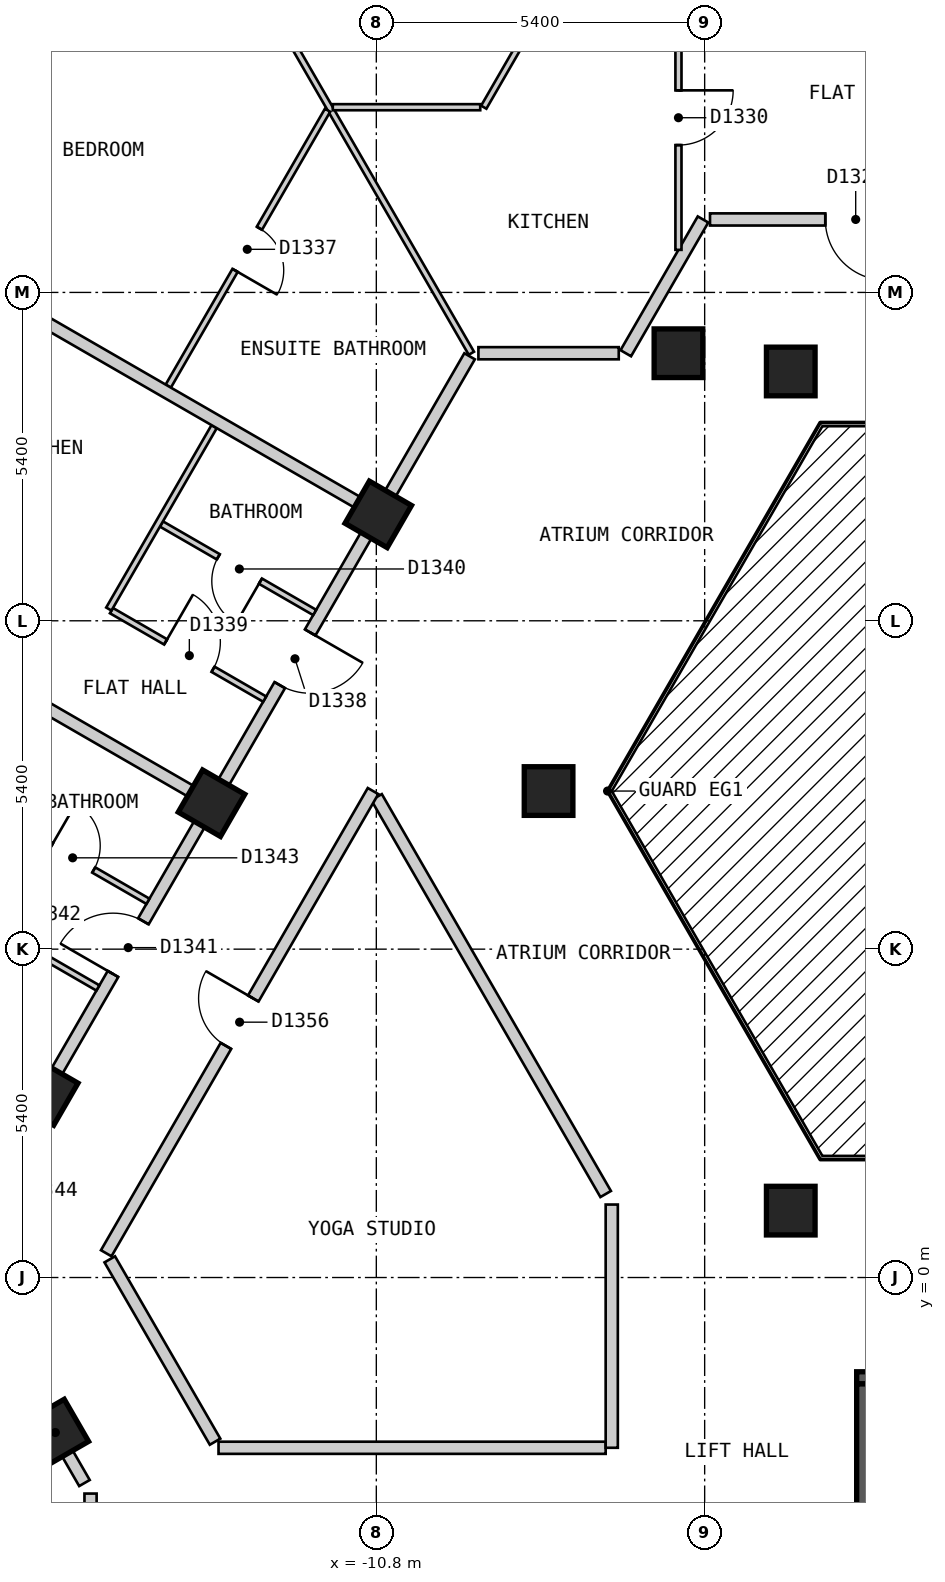
"""IFC4 building model, lengths in metres.
Left out: names, types, materials, properties, quantities, classifications, styles, units other than length and angle.
Written with IfcOpenShell. Run it as: python <this file> out.ifc"""

import sys

from ifc_helpers import new_model, si_unit, direction, frame, frame_2d, origin, origin_2d, place, context, subcontext, project, spatial, polyline, rectangle, outline, extrude, element, fill, save


model = new_model("IFC4")
c1 = context("Model", 3, precision=1e-05, world=origin(), true_north=direction((0.0, 1.0)))
c2 = subcontext(c1, "Body", "Model", "MODEL_VIEW")
j1 = project(units=[si_unit("LENGTHUNIT", "METRE"), si_unit("PLANEANGLEUNIT", "RADIAN")], contexts=[c1])
p1 = place(None, origin())
s1 = spatial("IfcSite", under=j1, at=p1, CompositionType="ELEMENT")
p2 = place(p1, origin())
s2 = spatial("IfcBuilding", under=s1, at=p2, CompositionType="ELEMENT")
p3 = place(p2, frame((0.0, 0.0, 147.6)))
s3 = spatial("IfcBuildingStorey", under=s2, at=p3, CompositionType="ELEMENT", Elevation=147.6)
for number, where, z_axis, x_axis in (
    (1, (-16.079, -2.549, 0.0), (0.0, 0.0, 1.0), (0.5, -0.866, 0.0)),
    (2, (-3.984, 14.9, 0.0), (0.0, 0.0, 1.0), (1.0, 0.0, 0.0)),
    (3, (-5.831, 15.2, 0.0), (0.0, 0.0, 1.0), (-1.0, 0.0, 0.0)),
    (4, (-10.768, 12.55, 0.0), (0.0, 0.0, 1.0), (-0.5, -0.866, 0.0)),
    (5, (-7.967, 8.0, 0.0), (0.0, 0.0, 1.0), (1.0, 0.0, 0.0)),
    (6, (-13.51, 7.8, 0.0), (0.0, 0.0, 1.0), (-0.5, -0.866, 0.0)),
    (7, (-3.984, 1.1, 0.0), (0.0, 0.0, 1.0), (1.0, 0.0, 0.0)),
    (8, (-16.253, 3.05, 0.0), (0.0, 0.0, 1.0), (-0.5, -0.866, 0.0)),
):
    element("IfcColumn", number, at=place(p3, frame(where, z_axis=z_axis, x_axis=x_axis)), inside=s3, PredefinedType="COLUMN", context=c2, shape_type="SweptSolid", body=[
        extrude(rectangle(XDim=0.8, YDim=0.8, at=origin_2d()), origin(), (0.0, 0.0, 1.0), 3.0),
    ])
p4 = place(p3, frame((-28.218, -2.025, 0.0), z_axis=(0.0, 0.0, 1.0), x_axis=(0.500017503135, -0.866015298109, 0.0)))
e9 = element("IfcWall", 9, at=p4, inside=s3, PredefinedType="SOLIDWALL", context=c2, shape_type="SweptSolid", body=[
    extrude(outline(polyline([(0.0, -0.15), (24.711, -0.15), (24.631, 0.15), (0.08, 0.15), (0.0, -0.15)])), origin(), (0.0, 0.0, 1.0), 2.7),
])
p5 = place(p4, frame((2.857, 0.0, 0.15)))
e10 = element("IfcOpeningElement", 10, at=p5, cuts=e9, PredefinedType="OPENING", context=c2, shape_type="SweptSolid", body=[
    extrude(rectangle(XDim=1.5, YDim=2.1, at=frame_2d((0.75, 1.05))), frame((0.0, 0.16, 0.0), z_axis=(0.0, -1.0, 0.0), x_axis=(1.0, 0.0, 0.0)), (0.0, 0.0, 1.0), 0.32),
])
p6 = place(p4, frame((8.689, 0.0, 0.15)))
e11 = element("IfcOpeningElement", 11, at=p6, cuts=e9, PredefinedType="OPENING", context=c2, shape_type="SweptSolid", body=[
    extrude(rectangle(XDim=1.5, YDim=2.1, at=frame_2d((0.75, 1.05))), frame((0.0, 0.16, 0.0), z_axis=(0.0, -1.0, 0.0), x_axis=(1.0, 0.0, 0.0)), (0.0, 0.0, 1.0), 0.32),
])
p7 = place(p4, frame((14.52, 0.0, 0.15)))
e12 = element("IfcOpeningElement", 12, at=p7, cuts=e9, PredefinedType="OPENING", context=c2, shape_type="SweptSolid", body=[
    extrude(rectangle(XDim=1.5, YDim=2.1, at=frame_2d((0.75, 1.05))), frame((0.0, 0.16, 0.0), z_axis=(0.0, -1.0, 0.0), x_axis=(1.0, 0.0, 0.0)), (0.0, 0.0, 1.0), 0.32),
])
p8 = place(p4, frame((20.351, 0.0, 0.15)))
e13 = element("IfcOpeningElement", 13, at=p8, cuts=e9, PredefinedType="OPENING", context=c2, shape_type="SweptSolid", body=[
    extrude(rectangle(XDim=1.5, YDim=2.1, at=frame_2d((0.75, 1.05))), frame((0.0, 0.16, 0.0), z_axis=(0.0, -1.0, 0.0), x_axis=(1.0, 0.0, 0.0)), (0.0, 0.0, 1.0), 0.32),
])
p9 = place(p3, frame((-2.9, -1.65, 0.0), z_axis=(0.0, 0.0, 1.0), x_axis=(1.0, 0.0, 0.0)))
e14 = element("IfcWall", 14, at=p9, inside=s3, PredefinedType="SOLIDWALL", context=c2, shape_type="SweptSolid", body=[
    extrude(rectangle(XDim=5.8, YDim=0.2, at=frame_2d((2.9, 0.0))), origin(), (0.0, 0.0, 1.0), 2.7),
])
p10 = place(p9, frame((0.3, 0.0, 0.0)))
e15 = element("IfcOpeningElement", 15, at=p10, cuts=e14, PredefinedType="OPENING", context=c2, shape_type="SweptSolid", body=[
    extrude(rectangle(XDim=1.2, YDim=2.1, at=frame_2d((0.6, 1.05))), frame((0.0, 0.11, 0.0), z_axis=(0.0, -1.0, 0.0), x_axis=(1.0, 0.0, 0.0)), (0.0, 0.0, 1.0), 0.22),
])
p11 = place(p3, frame((-2.8, -4.5, 0.0), z_axis=(0.0, 0.0, 1.0), x_axis=(0.0, 1.0, 0.0)))
e16 = element("IfcWall", 16, at=p11, inside=s3, PredefinedType="SOLIDWALL", context=c2, shape_type="SweptSolid", body=[
    extrude(rectangle(XDim=2.75, YDim=0.2, at=frame_2d((1.375, 0.0))), origin(), (0.0, 0.0, 1.0), 2.7),
])
p12 = place(p3, frame((-10.796, 7.9, 0.0), z_axis=(0.0, 0.0, 1.0), x_axis=(0.499954271211, -0.866051803703, 0.0)))
e17 = element("IfcWall", 17, at=p12, inside=s3, PredefinedType="PARTITIONING", context=c2, shape_type="SweptSolid", body=[
    extrude(rectangle(XDim=7.536, YDim=0.2, at=frame_2d((3.768, 0.0))), origin(), (0.0, 0.0, 1.0), 2.7),
])
p13 = place(p3, frame((-15.184, 0.299, 0.0), z_axis=(0.0, 0.0, 1.0), x_axis=(0.500149577091, -0.865939028186, 0.0)))
e18 = element("IfcWall", 18, at=p13, inside=s3, PredefinedType="PARTITIONING", context=c2, shape_type="SweptSolid", body=[
    extrude(rectangle(XDim=3.463, YDim=0.2, at=frame_2d((1.732, 0.0))), origin(), (0.0, 0.0, 1.0), 2.7),
])
p14 = place(p3, frame((-17.724, 0.299, 0.0), z_axis=(0.0, 0.0, 1.0), x_axis=(0.499923815713, -0.866069384335, 0.0)))
e19 = element("IfcWall", 19, at=p14, inside=s3, PredefinedType="PARTITIONING", context=c2, shape_type="SweptSolid", body=[
    extrude(rectangle(XDim=3.289, YDim=0.2, at=frame_2d((1.644, 0.0))), origin(), (0.0, 0.0, 1.0), 2.7),
])
p15 = place(p3, frame((-16.02, -2.652, 0.0), z_axis=(0.0, 0.0, 1.0), x_axis=(0.499764376199, -0.866161398518, 0.0)))
e20 = element("IfcWall", 20, at=p15, inside=s3, PredefinedType="PARTITIONING", context=c2, shape_type="SweptSolid", body=[
    extrude(rectangle(XDim=0.84, YDim=0.2, at=frame_2d((0.42, 0.0))), origin(), (0.0, 0.0, 1.0), 2.7),
])
p16 = place(p3, frame((-13.395, -2.8, 0.0), z_axis=(0.0, 0.0, 1.0), x_axis=(1.0, 0.0, 0.0)))
e21 = element("IfcWall", 21, at=p16, inside=s3, PredefinedType="PARTITIONING", context=c2, shape_type="SweptSolid", body=[
    extrude(rectangle(XDim=6.367, YDim=0.2, at=frame_2d((3.184, 0.0))), origin(), (0.0, 0.0, 1.0), 2.7),
])
p17 = place(p3, frame((-9.121, 15.2, 0.0), z_axis=(0.0, 0.0, 1.0), x_axis=(1.0, 0.0, 0.0)))
e22 = element("IfcWall", 22, at=p17, inside=s3, PredefinedType="PARTITIONING", context=c2, shape_type="SweptSolid", body=[
    extrude(rectangle(XDim=2.308, YDim=0.2, at=frame_2d((1.154, 0.0))), origin(), (0.0, 0.0, 1.0), 2.7),
])
p18 = place(p3, frame((-5.312, 17.4, 0.0), z_axis=(0.0, 0.0, 1.0), x_axis=(1.0, 0.0, 0.0)))
e23 = element("IfcWall", 23, at=p18, inside=s3, PredefinedType="PARTITIONING", context=c2, shape_type="SweptSolid", body=[
    extrude(rectangle(XDim=10.739, YDim=0.2, at=frame_2d((5.37, 0.0))), origin(), (0.0, 0.0, 1.0), 2.7),
])
p19 = place(p18, frame((1.896, 0.0, 0.0)))
e24 = element("IfcOpeningElement", 24, at=p19, cuts=e23, PredefinedType="OPENING", context=c2, shape_type="SweptSolid", body=[
    extrude(rectangle(XDim=1.0, YDim=2.1, at=frame_2d((0.5, 1.05))), frame((0.0, 0.11, 0.0), z_axis=(0.0, -1.0, 0.0), x_axis=(1.0, 0.0, 0.0)), (0.0, 0.0, 1.0), 0.22),
])
p20 = place(p3, frame((-15.242, 0.399, 0.0), z_axis=(0.0, 0.0, 1.0), x_axis=(0.499953615651, 0.866052182145, 0.0)))
e25 = element("IfcWall", 25, at=p20, inside=s3, PredefinedType="PARTITIONING", context=c2, shape_type="SweptSolid", body=[
    extrude(rectangle(XDim=8.777, YDim=0.2, at=frame_2d((4.388, 0.0))), origin(), (0.0, 0.0, 1.0), 2.7),
])
p21 = place(p20, frame((3.938, 0.0, 0.0)))
e26 = element("IfcOpeningElement", 26, at=p21, cuts=e25, PredefinedType="OPENING", context=c2, shape_type="SweptSolid", body=[
    extrude(rectangle(XDim=0.9, YDim=2.1, at=frame_2d((0.45, 1.05))), frame((0.0, 0.11, 0.0), z_axis=(0.0, -1.0, 0.0), x_axis=(1.0, 0.0, 0.0)), (0.0, 0.0, 1.0), 0.22),
])
p22 = place(p3, frame((-6.697, 15.2, 0.0), z_axis=(0.0, 0.0, 1.0), x_axis=(0.499963722229, 0.866046347752, 0.0)))
e27 = element("IfcWall", 27, at=p22, inside=s3, PredefinedType="PARTITIONING", context=c2, shape_type="SweptSolid", body=[
    extrude(rectangle(XDim=2.54, YDim=0.2, at=frame_2d((1.27, 0.0))), origin(), (0.0, 0.0, 1.0), 2.7),
])
p23 = place(p3, frame((-17.724, 0.5, 0.0), z_axis=(0.0, 0.0, 1.0), x_axis=(0.499994801602, 0.86602840506, 0.0)))
e28 = element("IfcWall", 28, at=p23, inside=s3, PredefinedType="PARTITIONING", context=c2, shape_type="SweptSolid", body=[
    extrude(rectangle(XDim=16.916, YDim=0.2, at=frame_2d((8.458, 0.0))), origin(), (0.0, 0.0, 1.0), 2.7),
])
p24 = place(p23, frame((10.672, 0.0, 0.0)))
e29 = element("IfcOpeningElement", 29, at=p24, cuts=e28, PredefinedType="OPENING", context=c2, shape_type="SweptSolid", body=[
    extrude(rectangle(XDim=1.0, YDim=2.1, at=frame_2d((0.5, 1.05))), frame((0.0, 0.11, 0.0), z_axis=(0.0, -1.0, 0.0), x_axis=(1.0, 0.0, 0.0)), (0.0, 0.0, 1.0), 0.22),
])
p25 = place(p23, frame((5.187, 0.0, 0.0)))
e30 = element("IfcOpeningElement", 30, at=p25, cuts=e28, PredefinedType="OPENING", context=c2, shape_type="SweptSolid", body=[
    extrude(rectangle(XDim=1.0, YDim=2.1, at=frame_2d((0.5, 1.05))), frame((0.0, 0.11, 0.0), z_axis=(0.0, -1.0, 0.0), x_axis=(1.0, 0.0, 0.0)), (0.0, 0.0, 1.0), 0.22),
])
p26 = place(p23, frame((0.566, 0.0, 0.0)))
e31 = element("IfcOpeningElement", 31, at=p26, cuts=e28, PredefinedType="OPENING", context=c2, shape_type="SweptSolid", body=[
    extrude(rectangle(XDim=1.0, YDim=2.1, at=frame_2d((0.5, 1.05))), frame((0.0, 0.11, 0.0), z_axis=(0.0, -1.0, 0.0), x_axis=(1.0, 0.0, 0.0)), (0.0, 0.0, 1.0), 0.22),
])
p27 = place(p3, frame((-6.928, -2.8, 0.0), z_axis=(0.0, 0.0, 1.0), x_axis=(0.0, 1.0, 0.0)))
e32 = element("IfcWall", 32, at=p27, inside=s3, PredefinedType="PARTITIONING", context=c2, shape_type="SweptSolid", body=[
    extrude(rectangle(XDim=4.0, YDim=0.2, at=frame_2d((2.0, 0.0))), origin(), (0.0, 0.0, 1.0), 2.7),
])
p28 = place(p3, frame((-15.5, -6.6, 0.0), z_axis=(0.0, 0.0, 1.0), x_axis=(0.0, 1.0, 0.0)))
e33 = element("IfcWall", 33, at=p28, inside=s3, PredefinedType="PARTITIONING", context=c2, shape_type="SweptSolid", body=[
    extrude(rectangle(XDim=3.047, YDim=0.2, at=frame_2d((1.523, 0.0))), origin(), (0.0, 0.0, 1.0), 2.7),
])
p29 = place(p3, frame((-14.37, 24.09, 0.0), z_axis=(0.0, 0.0, 1.0), x_axis=(0.50002438799, -0.866011322914, 0.0)))
e34 = element("IfcWall", 34, at=p29, inside=s3, PredefinedType="PARTITIONING", context=c2, shape_type="SweptSolid", body=[
    extrude(rectangle(XDim=10.266, YDim=0.1, at=frame_2d((5.133, 0.0))), origin(), (0.0, 0.0, 1.0), 2.7),
])
p30 = place(p29, frame((2.347, 0.0, 0.0)))
e35 = element("IfcOpeningElement", 35, at=p30, cuts=e34, PredefinedType="OPENING", context=c2, shape_type="SweptSolid", body=[
    extrude(rectangle(XDim=0.9, YDim=2.1, at=frame_2d((0.45, 1.05))), frame((0.0, 0.06, 0.0), z_axis=(0.0, -1.0, 0.0), x_axis=(1.0, 0.0, 0.0)), (0.0, 0.0, 1.0), 0.12),
])
p31 = place(p3, frame((-17.898, 6.217, 0.0), z_axis=(0.0, 0.0, 1.0), x_axis=(0.86592000186, -0.500182517066, 0.0)))
e36 = element("IfcWall", 36, at=p31, inside=s3, PredefinedType="PARTITIONING", context=c2, shape_type="SweptSolid", body=[
    extrude(rectangle(XDim=2.909, YDim=0.1, at=frame_2d((1.455, 0.0))), origin(), (0.0, 0.0, 1.0), 2.7),
])
p32 = place(p31, frame((1.029, 0.0, 0.0)))
e37 = element("IfcOpeningElement", 37, at=p32, cuts=e36, PredefinedType="OPENING", context=c2, shape_type="SweptSolid", body=[
    extrude(rectangle(XDim=0.9, YDim=2.1, at=frame_2d((0.45, 1.05))), frame((0.0, 0.06, 0.0), z_axis=(0.0, -1.0, 0.0), x_axis=(1.0, 0.0, 0.0)), (0.0, 0.0, 1.0), 0.12),
])
p33 = place(p3, frame((-17.076, 7.642, 0.0), z_axis=(0.0, 0.0, 1.0), x_axis=(0.866003949776, -0.500037157592, 0.0)))
e38 = element("IfcWall", 38, at=p33, inside=s3, PredefinedType="PARTITIONING", context=c2, shape_type="SweptSolid", body=[
    extrude(rectangle(XDim=2.91, YDim=0.1, at=frame_2d((1.455, 0.0))), origin(), (0.0, 0.0, 1.0), 2.7),
])
p34 = place(p33, frame((1.08, 0.0, 0.0)))
e39 = element("IfcOpeningElement", 39, at=p34, cuts=e38, PredefinedType="OPENING", context=c2, shape_type="SweptSolid", body=[
    extrude(rectangle(XDim=0.8, YDim=2.1, at=frame_2d((0.4, 1.05))), frame((0.0, 0.06, 0.0), z_axis=(0.0, -1.0, 0.0), x_axis=(1.0, 0.0, 0.0)), (0.0, 0.0, 1.0), 0.12),
])
p35 = place(p3, frame((-14.334, 12.392, 0.0), z_axis=(0.0, 0.0, 1.0), x_axis=(0.866003949776, -0.500037157592, 0.0)))
e40 = element("IfcWall", 40, at=p35, inside=s3, PredefinedType="PARTITIONING", context=c2, shape_type="SweptSolid", body=[
    extrude(rectangle(XDim=2.91, YDim=0.1, at=frame_2d((1.455, 0.0))), origin(), (0.0, 0.0, 1.0), 2.7),
])
p36 = place(p35, frame((1.08, 0.0, 0.0)))
e41 = element("IfcOpeningElement", 41, at=p36, cuts=e40, PredefinedType="OPENING", context=c2, shape_type="SweptSolid", body=[
    extrude(rectangle(XDim=0.8, YDim=2.1, at=frame_2d((0.4, 1.05))), frame((0.0, 0.06, 0.0), z_axis=(0.0, -1.0, 0.0), x_axis=(1.0, 0.0, 0.0)), (0.0, 0.0, 1.0), 0.12),
])
p37 = place(p3, frame((-15.156, 10.967, 0.0), z_axis=(0.0, 0.0, 1.0), x_axis=(0.866003949776, -0.500037157592, 0.0)))
e42 = element("IfcWall", 42, at=p37, inside=s3, PredefinedType="PARTITIONING", context=c2, shape_type="SweptSolid", body=[
    extrude(rectangle(XDim=2.91, YDim=0.1, at=frame_2d((1.455, 0.0))), origin(), (0.0, 0.0, 1.0), 2.7),
])
p38 = place(p37, frame((1.029, 0.0, 0.0)))
e43 = element("IfcOpeningElement", 43, at=p38, cuts=e42, PredefinedType="OPENING", context=c2, shape_type="SweptSolid", body=[
    extrude(rectangle(XDim=0.9, YDim=2.1, at=frame_2d((0.45, 1.05))), frame((0.0, 0.06, 0.0), z_axis=(0.0, -1.0, 0.0), x_axis=(1.0, 0.0, 0.0)), (0.0, 0.0, 1.0), 0.12),
])
p39 = place(p3, frame((-11.516, 19.246, 0.0), z_axis=(0.0, 0.0, 1.0), x_axis=(1.0, 0.0, 0.0)))
e44 = element("IfcWall", 44, at=p39, inside=s3, PredefinedType="PARTITIONING", context=c2, shape_type="SweptSolid", body=[
    extrude(rectangle(XDim=2.425, YDim=0.1, at=frame_2d((1.212, 0.0))), origin(), (0.0, 0.0, 1.0), 2.7),
])
p40 = place(p3, frame((-9.033, 19.246, 0.0), z_axis=(0.0, 0.0, 1.0), x_axis=(0.499963722229, 0.866046347752, 0.0)))
e45 = element("IfcWall", 45, at=p40, inside=s3, PredefinedType="PARTITIONING", context=c2, shape_type="SweptSolid", body=[
    extrude(rectangle(XDim=2.54, YDim=0.1, at=frame_2d((1.27, 0.0))), origin(), (0.0, 0.0, 1.0), 2.7),
])
p41 = place(p3, frame((-15.199, 10.993, 0.0), z_axis=(0.0, 0.0, 1.0), x_axis=(0.499885210257, 0.866091667531, 0.0)))
e46 = element("IfcWall", 46, at=p41, inside=s3, PredefinedType="PARTITIONING", context=c2, shape_type="SweptSolid", body=[
    extrude(rectangle(XDim=3.463, YDim=0.1, at=frame_2d((1.731, 0.0))), origin(), (0.0, 0.0, 1.0), 2.7),
])
p42 = place(p3, frame((-14.222, 14.659, 0.0), z_axis=(0.0, 0.0, 1.0), x_axis=(0.500053212623, 0.865994679283, 0.0)))
e47 = element("IfcWall", 47, at=p42, inside=s3, PredefinedType="PARTITIONING", context=c2, shape_type="SweptSolid", body=[
    extrude(rectangle(XDim=5.239, YDim=0.1, at=frame_2d((2.62, 0.0))), origin(), (0.0, 0.0, 1.0), 2.7),
])
p43 = place(p42, frame((2.198, 0.0, 0.0)))
e48 = element("IfcOpeningElement", 48, at=p43, cuts=e47, PredefinedType="OPENING", context=c2, shape_type="SweptSolid", body=[
    extrude(rectangle(XDim=0.8, YDim=2.1, at=frame_2d((0.4, 1.05))), frame((0.0, 0.06, 0.0), z_axis=(0.0, -1.0, 0.0), x_axis=(1.0, 0.0, 0.0)), (0.0, 0.0, 1.0), 0.12),
])
p44 = place(p3, frame((-5.831, 16.9, 0.0), z_axis=(0.0, 0.0, 1.0), x_axis=(0.0, 1.0, 0.0)))
e49 = element("IfcWall", 49, at=p44, inside=s3, PredefinedType="PARTITIONING", context=c2, shape_type="SweptSolid", body=[
    extrude(rectangle(XDim=4.546, YDim=0.1, at=frame_2d((2.273, 0.0))), origin(), (0.0, 0.0, 1.0), 2.7),
])
p45 = place(p44, frame((1.723, 0.0, 0.0)))
e50 = element("IfcOpeningElement", 50, at=p45, cuts=e49, PredefinedType="OPENING", context=c2, shape_type="SweptSolid", body=[
    extrude(rectangle(XDim=0.9, YDim=2.1, at=frame_2d((0.45, 1.05))), frame((0.0, 0.06, 0.0), z_axis=(0.0, -1.0, 0.0), x_axis=(1.0, 0.0, 0.0)), (0.0, 0.0, 1.0), 0.12),
])
p46 = place(p3, frame((-22.257, 12.85, 0.0), z_axis=(0.0, 0.0, 1.0), x_axis=(0.866047370643, -0.499961950354, 0.0)))
e51 = element("IfcWall", 51, at=p46, inside=s3, PredefinedType="PARTITIONING", context=c2, shape_type="SweptSolid", body=[
    extrude(rectangle(XDim=10.001, YDim=0.2, at=frame_2d((5.0, 0.0))), origin(), (0.0, 0.0, 1.0), 2.7),
])
p47 = place(p3, frame((-19.514, 17.599, 0.0), z_axis=(0.0, 0.0, 1.0), x_axis=(0.866059142644, -0.499941558027, 0.0)))
e52 = element("IfcWall", 52, at=p47, inside=s3, PredefinedType="PARTITIONING", context=c2, shape_type="SweptSolid", body=[
    extrude(rectangle(XDim=9.999, YDim=0.2, at=frame_2d((5.0, 0.0))), origin(), (0.0, 0.0, 1.0), 2.7),
])
p48 = place(p19, origin())
e53 = element("IfcDoor", 53, at=p48, inside=s3, OperationType="SINGLE_SWING_RIGHT", PredefinedType="DOOR", context=c2, shape_type="SweptSolid", body=[
    extrude(rectangle(XDim=1.0, YDim=2.1, at=frame_2d((0.5, 1.05))), frame((0.0, 0.025, 0.0), z_axis=(0.0, -1.0, 0.0), x_axis=(1.0, 0.0, 0.0)), (0.0, 0.0, 1.0), 0.05),
])
fill(e24, e53)
p49 = place(p45, origin())
e54 = element("IfcDoor", 54, at=p49, inside=s3, OperationType="SINGLE_SWING_RIGHT", PredefinedType="DOOR", context=c2, shape_type="SweptSolid", body=[
    extrude(rectangle(XDim=0.9, YDim=2.1, at=frame_2d((0.45, 1.05))), frame((0.0, 0.025, 0.0), z_axis=(0.0, -1.0, 0.0), x_axis=(1.0, 0.0, 0.0)), (0.0, 0.0, 1.0), 0.05),
])
fill(e50, e54)
p50 = place(p43, origin())
e55 = element("IfcDoor", 55, at=p50, inside=s3, OperationType="SINGLE_SWING_LEFT", PredefinedType="DOOR", context=c2, shape_type="SweptSolid", body=[
    extrude(rectangle(XDim=0.8, YDim=2.1, at=frame_2d((0.4, 1.05))), frame((0.0, 0.025, 0.0), z_axis=(0.0, -1.0, 0.0), x_axis=(1.0, 0.0, 0.0)), (0.0, 0.0, 1.0), 0.05),
])
fill(e48, e55)
p51 = place(p24, origin())
e56 = element("IfcDoor", 56, at=p51, inside=s3, OperationType="SINGLE_SWING_RIGHT", PredefinedType="DOOR", context=c2, shape_type="SweptSolid", body=[
    extrude(rectangle(XDim=1.0, YDim=2.1, at=frame_2d((0.5, 1.05))), frame((0.0, 0.025, 0.0), z_axis=(0.0, -1.0, 0.0), x_axis=(1.0, 0.0, 0.0)), (0.0, 0.0, 1.0), 0.05),
])
fill(e29, e56)
p52 = place(p38, origin())
e57 = element("IfcDoor", 57, at=p52, inside=s3, OperationType="SINGLE_SWING_LEFT", PredefinedType="DOOR", context=c2, shape_type="SweptSolid", body=[
    extrude(rectangle(XDim=0.9, YDim=2.1, at=frame_2d((0.45, 1.05))), frame((0.0, 0.025, 0.0), z_axis=(0.0, -1.0, 0.0), x_axis=(1.0, 0.0, 0.0)), (0.0, 0.0, 1.0), 0.05),
])
fill(e43, e57)
p53 = place(p36, origin())
e58 = element("IfcDoor", 58, at=p53, inside=s3, OperationType="SINGLE_SWING_RIGHT", PredefinedType="DOOR", context=c2, shape_type="SweptSolid", body=[
    extrude(rectangle(XDim=0.8, YDim=2.1, at=frame_2d((0.4, 1.05))), frame((0.0, 0.025, 0.0), z_axis=(0.0, -1.0, 0.0), x_axis=(1.0, 0.0, 0.0)), (0.0, 0.0, 1.0), 0.05),
])
fill(e41, e58)
p54 = place(p25, origin())
e59 = element("IfcDoor", 59, at=p54, inside=s3, OperationType="SINGLE_SWING_LEFT", PredefinedType="DOOR", context=c2, shape_type="SweptSolid", body=[
    extrude(rectangle(XDim=1.0, YDim=2.1, at=frame_2d((0.5, 1.05))), frame((0.0, 0.025, 0.0), z_axis=(0.0, -1.0, 0.0), x_axis=(1.0, 0.0, 0.0)), (0.0, 0.0, 1.0), 0.05),
])
fill(e30, e59)
p55 = place(p34, origin())
e60 = element("IfcDoor", 60, at=p55, inside=s3, OperationType="SINGLE_SWING_LEFT", PredefinedType="DOOR", context=c2, shape_type="SweptSolid", body=[
    extrude(rectangle(XDim=0.8, YDim=2.1, at=frame_2d((0.4, 1.05))), frame((0.0, 0.025, 0.0), z_axis=(0.0, -1.0, 0.0), x_axis=(1.0, 0.0, 0.0)), (0.0, 0.0, 1.0), 0.05),
])
fill(e39, e60)
p56 = place(p21, origin())
e61 = element("IfcDoor", 61, at=p56, inside=s3, OperationType="SINGLE_SWING_RIGHT", PredefinedType="DOOR", context=c2, shape_type="SweptSolid", body=[
    extrude(rectangle(XDim=0.9, YDim=2.1, at=frame_2d((0.45, 1.05))), frame((0.0, 0.025, 0.0), z_axis=(0.0, -1.0, 0.0), x_axis=(1.0, 0.0, 0.0)), (0.0, 0.0, 1.0), 0.05),
])
fill(e26, e61)
save(model, sys.argv[1])
